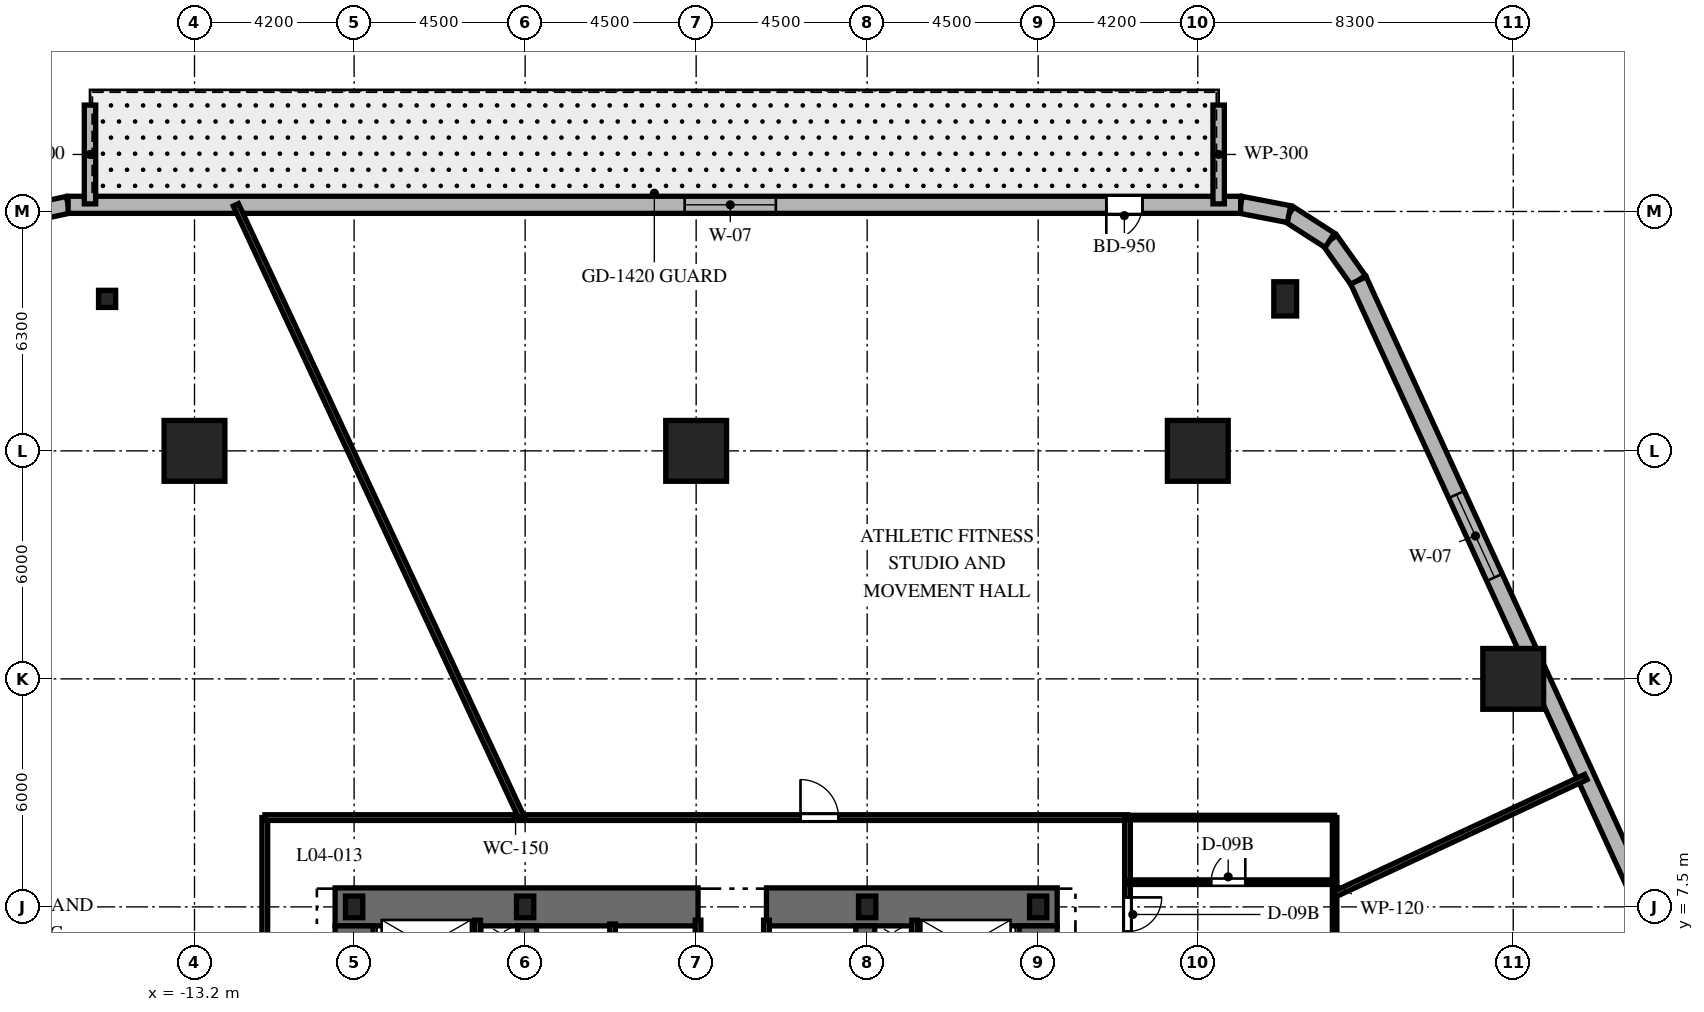
"""IFC4 building model, lengths in metres.
Left out: names, types, materials, properties, quantities, classifications, styles, units other than length and angle.
Written with IfcOpenShell. Run it as: python <this file> out.ifc"""

import sys

from ifc_helpers import new_model, si_unit, direction, frame, frame_2d, origin, origin_2d, place, context, subcontext, project, spatial, rectangle, i_section, extrude, element, fill, save


model = new_model("IFC4")
c1 = context("Model", 3, precision=1e-05, world=origin(), true_north=direction((0.0, 1.0)))
c2 = subcontext(c1, "Body", "Model", "MODEL_VIEW")
j1 = project(units=[si_unit("LENGTHUNIT", "METRE"), si_unit("PLANEANGLEUNIT", "RADIAN")], contexts=[c1])
p1 = place(None, origin())
s1 = spatial("IfcSite", under=j1, at=p1, CompositionType="ELEMENT")
p2 = place(p1, origin())
s2 = spatial("IfcBuilding", under=s1, at=p2, CompositionType="ELEMENT")
p3 = place(p2, frame((0.0, 0.0, 23.4)))
s3 = spatial("IfcBuildingStorey", under=s2, at=p3, CompositionType="ELEMENT", Elevation=23.4)
p4 = place(p3, frame((-9.5, 7.5, 0.0), z_axis=(0.0, 0.0, 1.0), x_axis=(1.0, 0.0, 0.0)))
e1 = element("IfcWall", 1, at=p4, inside=s3, PredefinedType="SHEAR", context=c2, shape_type="SweptSolid", body=[
    extrude(rectangle(XDim=9.55, YDim=1.0, at=frame_2d((4.775, 0.0))), origin(), (0.0, 0.0, 1.0), 4.8),
])
p5 = place(p3, frame((1.85, 7.5, 0.0), z_axis=(0.0, 0.0, 1.0), x_axis=(1.0, 0.0, 0.0)))
e2 = element("IfcWall", 2, at=p5, inside=s3, PredefinedType="SHEAR", context=c2, shape_type="SweptSolid", body=[
    extrude(rectangle(XDim=7.65, YDim=1.0, at=frame_2d((3.825, 0.0))), origin(), (0.0, 0.0, 1.0), 4.8),
])
p6 = place(p3, frame((-9.0, -7.0, 0.0), z_axis=(0.0, 0.0, 1.0), x_axis=(0.0, 1.0, 0.0)))
e3 = element("IfcWall", 3, at=p6, inside=s3, PredefinedType="SHEAR", context=c2, shape_type="SweptSolid", body=[
    extrude(rectangle(XDim=14.0, YDim=1.0, at=frame_2d((7.0, 0.0))), origin(), (0.0, 0.0, 1.0), 4.8),
])
p7 = place(p6, frame((10.125, 0.0, 0.0)))
e4 = element("IfcOpeningElement", 4, at=p7, cuts=e3, PredefinedType="OPENING", context=c2, shape_type="SweptSolid", body=[
    extrude(rectangle(XDim=1.05, YDim=2.15, at=frame_2d((0.525, 1.075))), frame((0.0, 0.51, 0.0), z_axis=(0.0, -1.0, 0.0), x_axis=(1.0, 0.0, 0.0)), (0.0, 0.0, 1.0), 1.02),
])
p8 = place(p3, frame((9.0, -7.0, 0.0), z_axis=(0.0, 0.0, 1.0), x_axis=(0.0, 1.0, 0.0)))
e5 = element("IfcWall", 5, at=p8, inside=s3, PredefinedType="SHEAR", context=c2, shape_type="SweptSolid", body=[
    extrude(rectangle(XDim=14.0, YDim=1.0, at=frame_2d((7.0, 0.0))), origin(), (0.0, 0.0, 1.0), 4.8),
])
p9 = place(p8, frame((10.125, 0.0, 0.0)))
e6 = element("IfcOpeningElement", 6, at=p9, cuts=e5, PredefinedType="OPENING", context=c2, shape_type="SweptSolid", body=[
    extrude(rectangle(XDim=1.05, YDim=2.15, at=frame_2d((0.525, 1.075))), frame((0.0, 0.51, 0.0), z_axis=(0.0, -1.0, 0.0), x_axis=(1.0, 0.0, 0.0)), (0.0, 0.0, 1.0), 1.02),
])
for number, where, z_axis, x_axis in (
    (7, (-4.45, 2.25, 0.0), (0.0, 0.0, 1.0), (0.0, 1.0, 0.0)),
    (8, (4.45, 2.25, 0.0), (0.0, 0.0, 1.0), (0.0, 1.0, 0.0)),
):
    element("IfcWall", number, at=place(p3, frame(where, z_axis=z_axis, x_axis=x_axis)), inside=s3, PredefinedType="SHEAR", context=c2, shape_type="SweptSolid", body=[
        extrude(rectangle(XDim=4.75, YDim=0.5, at=frame_2d((2.375, 0.0))), origin(), (0.0, 0.0, 1.0), 4.8),
    ])
for number, where, z_axis, x_axis in (
    (9, (9.0, 7.5, 0.0), (0.0, 0.0, 1.0), (1.0, 0.0, 0.0)),
    (10, (4.5, 7.5, 0.0), (0.0, 0.0, 1.0), (1.0, 0.0, 0.0)),
    (11, (-4.5, 7.5, 0.0), (0.0, 0.0, 1.0), (1.0, 0.0, 0.0)),
    (12, (-9.0, 7.5, 0.0), (0.0, 0.0, 1.0), (1.0, 0.0, 0.0)),
):
    element("IfcColumn", number, at=place(p3, frame(where, z_axis=z_axis, x_axis=x_axis)), inside=s3, PredefinedType="COLUMN", context=c2, shape_type="SweptSolid", body=[
        extrude(i_section(OverallWidth=0.454, OverallDepth=0.569, WebThickness=0.078, FlangeThickness=0.125, at=origin_2d()), origin(), (0.0, 0.0, 1.0), 4.8),
    ])
for number, where, z_axis, x_axis in (
    (13, (21.5, 13.5, 0.0), (0.0, 0.0, 1.0), (1.0, 0.0, 0.0)),
    (14, (-13.2, 19.5, 0.0), (0.0, 0.0, 1.0), (1.0, 0.0, 0.0)),
    (15, (0.0, 19.5, 0.0), (0.0, 0.0, 1.0), (1.0, 0.0, 0.0)),
    (16, (13.2, 19.5, 0.0), (0.0, 0.0, 1.0), (1.0, 0.0, 0.0)),
):
    element("IfcColumn", number, at=place(p3, frame(where, z_axis=z_axis, x_axis=x_axis)), inside=s3, PredefinedType="COLUMN", context=c2, shape_type="SweptSolid", body=[
        extrude(rectangle(XDim=1.6, YDim=1.6, at=origin_2d()), origin(), (0.0, 0.0, 1.0), 4.8),
    ])
p10 = place(p3, frame((15.5, 23.5, 0.0), z_axis=(0.0, 0.0, 1.0), x_axis=(1.0, 0.0, 0.0)))
e17 = element("IfcColumn", 17, at=p10, inside=s3, PredefinedType="PILASTER", context=c2, shape_type="SweptSolid", body=[
    extrude(rectangle(XDim=0.6, YDim=0.9, at=origin_2d()), origin(), (0.0, 0.0, 1.0), 4.8),
])
p11 = place(p3, frame((-15.5, 23.5, 0.0), z_axis=(0.0, 0.0, 1.0), x_axis=(1.0, 0.0, 0.0)))
e18 = element("IfcColumn", 18, at=p11, inside=s3, PredefinedType="PILASTER", context=c2, shape_type="SweptSolid", body=[
    extrude(rectangle(XDim=0.45, YDim=0.45, at=origin_2d()), origin(), (0.0, 0.0, 1.0), 4.8),
])
p12 = place(p3, frame((17.427, 23.986, 0.0), z_axis=(0.0, 0.0, 1.0), x_axis=(-0.580668110146, 0.814140372331, 0.0)))
e19 = element("IfcWall", 19, at=p12, inside=s3, PredefinedType="SOLIDWALL", context=c2, shape_type="SweptSolid", body=[
    extrude(rectangle(XDim=1.297, YDim=0.45, at=frame_2d((0.648, 0.0))), origin(), (0.0, 0.0, 1.0), 4.48),
])
p13 = place(p3, frame((16.674, 25.042, 0.0), z_axis=(0.0, 0.0, 1.0), x_axis=(-0.84167601366, 0.539982859014, 0.0)))
e20 = element("IfcWall", 20, at=p13, inside=s3, PredefinedType="SOLIDWALL", context=c2, shape_type="SweptSolid", body=[
    extrude(rectangle(XDim=1.275, YDim=0.45, at=frame_2d((0.637, 0.0))), origin(), (0.0, 0.0, 1.0), 4.48),
])
p14 = place(p3, frame((15.601, 25.73, 0.0), z_axis=(0.0, 0.0, 1.0), x_axis=(-0.981932506301, 0.189231480121, 0.0)))
e21 = element("IfcWall", 21, at=p14, inside=s3, PredefinedType="SOLIDWALL", context=c2, shape_type="SweptSolid", body=[
    extrude(rectangle(XDim=1.297, YDim=0.45, at=frame_2d((0.648, 0.0))), origin(), (0.0, 0.0, 1.0), 4.48),
])
p15 = place(p3, frame((-16.526, 25.975, 0.0), z_axis=(0.0, 0.0, 1.0), x_axis=(-0.977966843806, -0.208760274995, 0.0)))
e22 = element("IfcWall", 22, at=p15, inside=s3, PredefinedType="SOLIDWALL", context=c2, shape_type="SweptSolid", body=[
    extrude(rectangle(XDim=1.431, YDim=0.45, at=frame_2d((0.716, 0.0))), origin(), (0.0, 0.0, 1.0), 4.48),
])
p16 = place(p3, frame((27.21, 2.626, 0.0), z_axis=(0.0, 0.0, 1.0), x_axis=(-0.416421752646, 0.909171559126, 0.0)))
e23 = element("IfcWall", 23, at=p16, inside=s3, PredefinedType="SOLIDWALL", context=c2, shape_type="SweptSolid", body=[
    extrude(rectangle(XDim=23.493, YDim=0.45, at=frame_2d((11.747, 0.0))), origin(), (0.0, 0.0, 1.0), 4.48),
])
p17 = place(p16, frame((3.57, 0.0, 0.85)))
e24 = element("IfcOpeningElement", 24, at=p17, cuts=e23, PredefinedType="OPENING", context=c2, shape_type="SweptSolid", body=[
    extrude(rectangle(XDim=2.4, YDim=2.4, at=frame_2d((1.2, 1.2))), frame((0.0, 0.235, 0.0), z_axis=(0.0, -1.0, 0.0), x_axis=(1.0, 0.0, 0.0)), (0.0, 0.0, 1.0), 0.47),
])
p18 = place(p16, frame((14.896, 0.0, 0.85)))
e25 = element("IfcOpeningElement", 25, at=p18, cuts=e23, PredefinedType="OPENING", context=c2, shape_type="SweptSolid", body=[
    extrude(rectangle(XDim=2.4, YDim=2.4, at=frame_2d((1.2, 1.2))), frame((0.0, 0.235, 0.0), z_axis=(0.0, -1.0, 0.0), x_axis=(1.0, 0.0, 0.0)), (0.0, 0.0, 1.0), 0.47),
])
p19 = place(p3, frame((14.328, 25.975, 0.0), z_axis=(0.0, 0.0, 1.0), x_axis=(-1.0, 0.0, 0.0)))
e26 = element("IfcWall", 26, at=p19, inside=s3, PredefinedType="SOLIDWALL", context=c2, shape_type="SweptSolid", body=[
    extrude(rectangle(XDim=30.854, YDim=0.45, at=frame_2d((15.427, 0.0))), origin(), (0.0, 0.0, 1.0), 4.48),
])
p20 = place(p19, frame((2.585, 0.0, 0.0)))
e27 = element("IfcOpeningElement", 27, at=p20, cuts=e26, PredefinedType="OPENING", context=c2, shape_type="SweptSolid", body=[
    extrude(rectangle(XDim=0.95, YDim=2.15, at=frame_2d((0.475, 1.075))), frame((0.0, 0.235, 0.0), z_axis=(0.0, -1.0, 0.0), x_axis=(1.0, 0.0, 0.0)), (0.0, 0.0, 1.0), 0.47),
])
p21 = place(p19, frame((12.23, 0.0, 0.85)))
e28 = element("IfcOpeningElement", 28, at=p21, cuts=e26, PredefinedType="OPENING", context=c2, shape_type="SweptSolid", body=[
    extrude(rectangle(XDim=2.4, YDim=2.4, at=frame_2d((1.2, 1.2))), frame((0.0, 0.235, 0.0), z_axis=(0.0, -1.0, 0.0), x_axis=(1.0, 0.0, 0.0)), (0.0, 0.0, 1.0), 0.47),
])
for number, where, z_axis, x_axis in (
    (29, (13.749, 26.0, 0.0), (0.0, 0.0, 1.0), (0.0, 1.0, 0.0)),
    (30, (-15.95, 26.0, 0.0), (0.0, 0.0, 1.0), (0.0, 1.0, 0.0)),
):
    element("IfcWall", number, at=place(p3, frame(where, z_axis=z_axis, x_axis=x_axis)), inside=s3, PredefinedType="PARAPET", context=c2, shape_type="SweptSolid", body=[
        extrude(rectangle(XDim=2.6, YDim=0.3, at=frame_2d((1.3, 0.0))), origin(), (0.0, 0.0, 1.0), 1.15),
    ])
for number, where, z_axis, x_axis in (
    (31, (-5.75, 5.74, 0.0), (0.0, 0.0, 1.0), (0.0, 1.0, 0.0)),
    (32, (5.75, 5.74, 0.0), (0.0, 0.0, 1.0), (0.0, 1.0, 0.0)),
):
    element("IfcWall", number, at=place(p3, frame(where, z_axis=z_axis, x_axis=x_axis)), inside=s3, PredefinedType="PARTITIONING", context=c2, shape_type="SweptSolid", body=[
        extrude(rectangle(XDim=1.41, YDim=0.15, at=frame_2d((0.705, 0.0))), origin(), (0.0, 0.0, 1.0), 4.48),
    ])
p22 = place(p3, frame((-2.2, 5.2, 0.0), z_axis=(0.0, 0.0, 1.0), x_axis=(0.0, 1.0, 0.0)))
e33 = element("IfcWall", 33, at=p22, inside=s3, PredefinedType="PARTITIONING", context=c2, shape_type="SweptSolid", body=[
    extrude(rectangle(XDim=1.85, YDim=0.15, at=frame_2d((0.925, 0.0))), origin(), (0.0, 0.0, 1.0), 4.48),
])
for number, where, z_axis, x_axis in (
    (34, (0.05, 5.2, 0.0), (0.0, 0.0, 1.0), (0.0, 1.0, 0.0)),
    (35, (1.85, 5.2, 0.0), (0.0, 0.0, 1.0), (0.0, 1.0, 0.0)),
):
    element("IfcWall", number, at=place(p3, frame(where, z_axis=z_axis, x_axis=x_axis)), inside=s3, PredefinedType="PARTITIONING", context=c2, shape_type="SweptSolid", body=[
        extrude(rectangle(XDim=1.95, YDim=0.15, at=frame_2d((0.975, 0.0))), origin(), (0.0, 0.0, 1.0), 4.48),
    ])
p23 = place(p3, frame((-11.35, -9.85, 0.0), z_axis=(0.0, 0.0, 1.0), x_axis=(0.0, 1.0, 0.0)))
e36 = element("IfcWall", 36, at=p23, inside=s3, PredefinedType="PARTITIONING", context=c2, shape_type="SweptSolid", body=[
    extrude(rectangle(XDim=19.7, YDim=0.15, at=frame_2d((9.85, 0.0))), origin(), (0.0, 0.0, 1.0), 3.522),
])
p24 = place(p23, frame((0.571, 0.0, 0.0)))
e37 = element("IfcOpeningElement", 37, at=p24, cuts=e36, PredefinedType="OPENING", context=c2, shape_type="SweptSolid", body=[
    extrude(rectangle(XDim=1.0, YDim=2.03, at=frame_2d((0.5, 1.015))), frame((0.0, 0.085, 0.0), z_axis=(0.0, -1.0, 0.0), x_axis=(1.0, 0.0, 0.0)), (0.0, 0.0, 1.0), 0.17),
])
p25 = place(p23, frame((10.155, 0.0, 0.0)))
e38 = element("IfcOpeningElement", 38, at=p25, cuts=e36, PredefinedType="OPENING", context=c2, shape_type="SweptSolid", body=[
    extrude(rectangle(XDim=1.0, YDim=2.03, at=frame_2d((0.5, 1.015))), frame((0.0, 0.085, 0.0), z_axis=(0.0, -1.0, 0.0), x_axis=(1.0, 0.0, 0.0)), (0.0, 0.0, 1.0), 0.17),
])
p26 = place(p3, frame((-11.35, 9.85, 0.0), z_axis=(0.0, 0.0, 1.0), x_axis=(1.0, 0.0, 0.0)))
e39 = element("IfcWall", 39, at=p26, inside=s3, PredefinedType="PARTITIONING", context=c2, shape_type="SweptSolid", body=[
    extrude(rectangle(XDim=22.7, YDim=0.15, at=frame_2d((11.35, 0.0))), origin(), (0.0, 0.0, 1.0), 3.522),
])
p27 = place(p26, frame((14.096, 0.0, 0.0)))
e40 = element("IfcOpeningElement", 40, at=p27, cuts=e39, PredefinedType="OPENING", context=c2, shape_type="SweptSolid", body=[
    extrude(rectangle(XDim=1.0, YDim=2.03, at=frame_2d((0.5, 1.015))), frame((0.0, 0.085, 0.0), z_axis=(0.0, -1.0, 0.0), x_axis=(1.0, 0.0, 0.0)), (0.0, 0.0, 1.0), 0.17),
])
p28 = place(p3, frame((11.35, 9.85, 0.0), z_axis=(0.0, 0.0, 1.0), x_axis=(0.0, -1.0, 0.0)))
e41 = element("IfcWall", 41, at=p28, inside=s3, PredefinedType="PARTITIONING", context=c2, shape_type="SweptSolid", body=[
    extrude(rectangle(XDim=19.7, YDim=0.15, at=frame_2d((9.85, 0.0))), origin(), (0.0, 0.0, 1.0), 3.522),
])
p29 = place(p28, frame((2.1, 0.0, 0.0)))
e42 = element("IfcOpeningElement", 42, at=p29, cuts=e41, PredefinedType="OPENING", context=c2, shape_type="SweptSolid", body=[
    extrude(rectangle(XDim=0.9, YDim=2.03, at=frame_2d((0.45, 1.015))), frame((0.0, 0.085, 0.0), z_axis=(0.0, -1.0, 0.0), x_axis=(1.0, 0.0, 0.0)), (0.0, 0.0, 1.0), 0.17),
])
p30 = place(p28, frame((16.875, 0.0, 0.0)))
e43 = element("IfcOpeningElement", 43, at=p30, cuts=e41, PredefinedType="OPENING", context=c2, shape_type="SweptSolid", body=[
    extrude(rectangle(XDim=1.0, YDim=2.03, at=frame_2d((0.5, 1.015))), frame((0.0, 0.085, 0.0), z_axis=(0.0, -1.0, 0.0), x_axis=(1.0, 0.0, 0.0)), (0.0, 0.0, 1.0), 0.17),
])
p31 = place(p3, frame((16.8, 6.45, 0.0), z_axis=(0.0, 0.0, 1.0), x_axis=(0.0, 1.0, 0.0)))
e44 = element("IfcWall", 44, at=p31, inside=s3, PredefinedType="PARTITIONING", context=c2, shape_type="SweptSolid", body=[
    extrude(rectangle(XDim=3.4, YDim=0.12, at=frame_2d((1.7, 0.0))), origin(), (0.0, 0.0, 1.0), 4.48),
])
p32 = place(p3, frame((11.35, 9.85, 0.0), z_axis=(0.0, 0.0, 1.0), x_axis=(1.0, 0.0, 0.0)))
e45 = element("IfcWall", 45, at=p32, inside=s3, PredefinedType="PARTITIONING", context=c2, shape_type="SweptSolid", body=[
    extrude(rectangle(XDim=5.45, YDim=0.12, at=frame_2d((2.725, 0.0))), origin(), (0.0, 0.0, 1.0), 3.615),
])
p33 = place(p3, frame((11.35, 8.15, 0.0), z_axis=(0.0, 0.0, 1.0), x_axis=(1.0, 0.0, 0.0)))
e46 = element("IfcWall", 46, at=p33, inside=s3, PredefinedType="PARTITIONING", context=c2, shape_type="SweptSolid", body=[
    extrude(rectangle(XDim=5.45, YDim=0.12, at=frame_2d((2.725, 0.0))), origin(), (0.0, 0.0, 1.0), 4.48),
])
p34 = place(p33, frame((2.2, 0.0, 0.0)))
e47 = element("IfcOpeningElement", 47, at=p34, cuts=e46, PredefinedType="OPENING", context=c2, shape_type="SweptSolid", body=[
    extrude(rectangle(XDim=0.9, YDim=2.03, at=frame_2d((0.45, 1.015))), frame((0.0, 0.07, 0.0), z_axis=(0.0, -1.0, 0.0), x_axis=(1.0, 0.0, 0.0)), (0.0, 0.0, 1.0), 0.14),
])
p35 = place(p3, frame((16.8, 7.834, 0.0), z_axis=(0.0, 0.0, 1.0), x_axis=(0.906307919131, 0.422617978463, 0.0)))
e48 = element("IfcWall", 48, at=p35, inside=s3, PredefinedType="PARTITIONING", context=c2, shape_type="SweptSolid", body=[
    extrude(rectangle(XDim=7.296, YDim=0.15, at=frame_2d((3.648, 0.0))), origin(), (0.0, 0.0, 1.0), 3.615),
])
p36 = place(p3, frame((-4.593, 9.85, 0.0), z_axis=(0.0, 0.0, 1.0), x_axis=(-0.422621776004, 0.906306148301, 0.0)))
e49 = element("IfcWall", 49, at=p36, inside=s3, PredefinedType="PARTITIONING", context=c2, shape_type="SweptSolid", body=[
    extrude(rectangle(XDim=17.792, YDim=0.15, at=frame_2d((8.896, 0.0))), origin(), (0.0, 0.0, 1.0), 3.522),
])
p37 = place(p18, origin())
e50 = element("IfcWindow", 50, at=p37, inside=s3, PartitioningType="SINGLE_PANEL", PredefinedType="WINDOW", context=c2, shape_type="SweptSolid", body=[
    extrude(rectangle(XDim=2.4, YDim=2.4, at=frame_2d((1.2, 1.2))), frame((0.0, 0.03, 0.0), z_axis=(0.0, -1.0, 0.0), x_axis=(1.0, 0.0, 0.0)), (0.0, 0.0, 1.0), 0.06),
])
fill(e25, e50)
p38 = place(p20, origin())
e51 = element("IfcDoor", 51, at=p38, inside=s3, OperationType="SINGLE_SWING_RIGHT", PredefinedType="DOOR", context=c2, shape_type="SweptSolid", body=[
    extrude(rectangle(XDim=0.95, YDim=2.15, at=frame_2d((0.475, 1.075))), frame((0.0, 0.025, 0.0), z_axis=(0.0, -1.0, 0.0), x_axis=(1.0, 0.0, 0.0)), (0.0, 0.0, 1.0), 0.05),
])
fill(e27, e51)
p39 = place(p21, origin())
e52 = element("IfcWindow", 52, at=p39, inside=s3, PartitioningType="SINGLE_PANEL", PredefinedType="WINDOW", context=c2, shape_type="SweptSolid", body=[
    extrude(rectangle(XDim=2.4, YDim=2.4, at=frame_2d((1.2, 1.2))), frame((0.0, 0.03, 0.0), z_axis=(0.0, -1.0, 0.0), x_axis=(1.0, 0.0, 0.0)), (0.0, 0.0, 1.0), 0.06),
])
fill(e28, e52)
p40 = place(p29, origin())
e53 = element("IfcDoor", 53, at=p40, inside=s3, OperationType="SINGLE_SWING_LEFT", PredefinedType="DOOR", context=c2, shape_type="SweptSolid", body=[
    extrude(rectangle(XDim=0.9, YDim=2.03, at=frame_2d((0.45, 1.015))), frame((0.0, 0.025, 0.0), z_axis=(0.0, -1.0, 0.0), x_axis=(1.0, 0.0, 0.0)), (0.0, 0.0, 1.0), 0.05),
])
fill(e42, e53)
p41 = place(p34, origin())
e54 = element("IfcDoor", 54, at=p41, inside=s3, OperationType="SINGLE_SWING_RIGHT", PredefinedType="DOOR", context=c2, shape_type="SweptSolid", body=[
    extrude(rectangle(XDim=0.9, YDim=2.03, at=frame_2d((0.45, 1.015))), frame((0.0, 0.025, 0.0), z_axis=(0.0, -1.0, 0.0), x_axis=(1.0, 0.0, 0.0)), (0.0, 0.0, 1.0), 0.05),
])
fill(e47, e54)
p42 = place(p27, origin())
e55 = element("IfcDoor", 55, at=p42, inside=s3, OperationType="SINGLE_SWING_LEFT", PredefinedType="DOOR", context=c2, shape_type="SweptSolid", body=[
    extrude(rectangle(XDim=1.0, YDim=2.03, at=frame_2d((0.5, 1.015))), frame((0.0, 0.025, 0.0), z_axis=(0.0, -1.0, 0.0), x_axis=(1.0, 0.0, 0.0)), (0.0, 0.0, 1.0), 0.05),
])
fill(e40, e55)
save(model, sys.argv[1])
